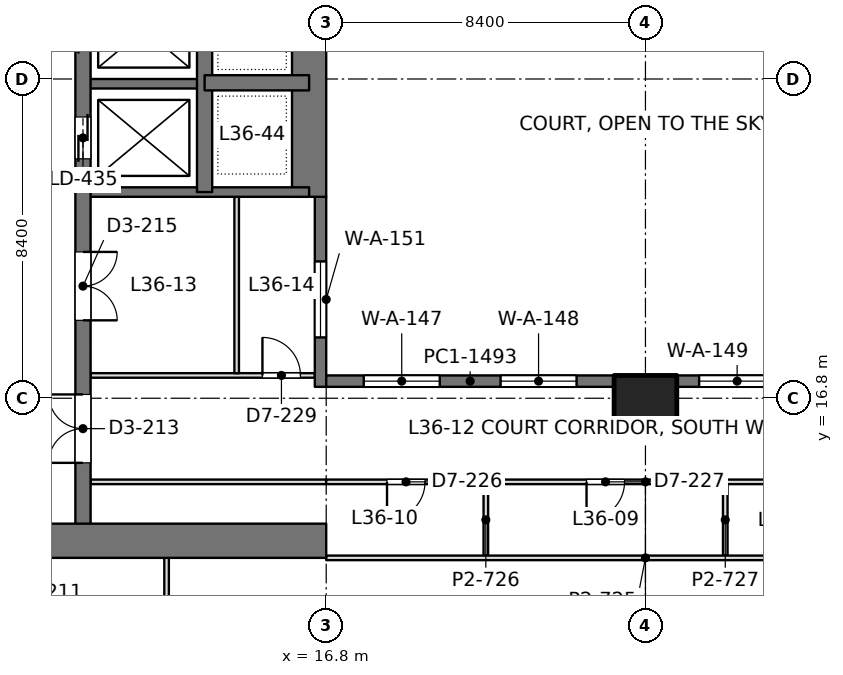
"""IFC4 building model, lengths in metres.
Left out: names, types, materials, properties, quantities, classifications, styles, units other than length and angle.
Written with IfcOpenShell. Run it as: python <this file> out.ifc"""

import sys

from ifc_helpers import new_model, si_unit, direction, frame, frame_2d, origin, origin_2d, place, context, subcontext, project, spatial, rectangle, extrude, element, fill, save


model = new_model("IFC4")
c1 = context("Model", 3, precision=1e-05, world=origin(), true_north=direction((0.0, 1.0)))
c2 = subcontext(c1, "Body", "Model", "MODEL_VIEW")
j1 = project(units=[si_unit("LENGTHUNIT", "METRE"), si_unit("PLANEANGLEUNIT", "RADIAN")], contexts=[c1])
p1 = place(None, origin())
s1 = spatial("IfcSite", under=j1, at=p1, CompositionType="ELEMENT")
p2 = place(p1, origin())
s2 = spatial("IfcBuilding", under=s1, at=p2, CompositionType="ELEMENT")
p3 = place(p2, frame((0.0, 0.0, 159.6)))
s3 = spatial("IfcBuildingStorey", under=s2, at=p3, CompositionType="ELEMENT", Elevation=159.6)
p4 = place(p3, frame((25.2, 16.8, 0.0), z_axis=(0.0, 0.0, 1.0), x_axis=(1.0, 0.0, 0.0)))
e1 = element("IfcColumn", 1, at=p4, inside=s3, PredefinedType="COLUMN", context=c2, shape_type="SweptSolid", body=[
    extrude(rectangle(XDim=1.65, YDim=1.2, at=origin_2d()), origin(), (0.0, 0.0, 1.0), 4.2),
])
p5 = place(p3, frame((-1.2, 13.05, 0.0), z_axis=(0.0, 0.0, 1.0), x_axis=(1.0, 0.0, 0.0)))
e2 = element("IfcWall", 2, at=p5, inside=s3, PredefinedType="SHEAR", context=c2, shape_type="SweptSolid", body=[
    extrude(rectangle(XDim=18.0, YDim=0.9, at=frame_2d((9.0, 0.0))), origin(), (0.0, 0.0, 1.0), 4.2),
])
p6 = place(p5, frame((8.95, 0.0, 0.0)))
e3 = element("IfcOpeningElement", 3, at=p6, cuts=e2, PredefinedType="OPENING", context=c2, shape_type="SweptSolid", body=[
    extrude(rectangle(XDim=1.8, YDim=2.4, at=frame_2d((0.9, 1.2))), frame((0.0, 0.46, 0.0), z_axis=(0.0, -1.0, 0.0), x_axis=(1.0, 0.0, 0.0)), (0.0, 0.0, 1.0), 0.92),
])
p7 = place(p3, frame((16.35, 22.1, 0.0), z_axis=(0.0, 0.0, 1.0), x_axis=(0.0, 1.0, 0.0)))
e4 = element("IfcWall", 4, at=p7, inside=s3, PredefinedType="SHEAR", context=c2, shape_type="SweptSolid", body=[
    extrude(rectangle(XDim=15.25, YDim=0.9, at=frame_2d((7.625, 0.0))), origin(), (0.0, 0.0, 1.0), 4.2),
])
p8 = place(p3, frame((10.4, 13.05, 0.0), z_axis=(0.0, 0.0, 1.0), x_axis=(0.0, 1.0, 0.0)))
e5 = element("IfcWall", 5, at=p8, inside=s3, PredefinedType="SHEAR", context=c2, shape_type="SweptSolid", body=[
    extrude(rectangle(XDim=24.3, YDim=0.4, at=frame_2d((12.15, 0.0))), origin(), (0.0, 0.0, 1.0), 4.2),
])
p9 = place(p8, frame((10.05, 0.0, 0.0)))
e6 = element("IfcOpeningElement", 6, at=p9, cuts=e5, PredefinedType="OPENING", context=c2, shape_type="SweptSolid", body=[
    extrude(rectangle(XDim=1.1, YDim=2.2, at=frame_2d((0.55, 1.1))), frame((0.0, 0.21, 0.0), z_axis=(0.0, -1.0, 0.0), x_axis=(1.0, 0.0, 0.0)), (0.0, 0.0, 1.0), 0.42),
])
p10 = place(p8, frame((12.9, 0.0, 0.0)))
e7 = element("IfcOpeningElement", 7, at=p10, cuts=e5, PredefinedType="OPENING", context=c2, shape_type="SweptSolid", body=[
    extrude(rectangle(XDim=1.1, YDim=2.2, at=frame_2d((0.55, 1.1))), frame((0.0, 0.21, 0.0), z_axis=(0.0, -1.0, 0.0), x_axis=(1.0, 0.0, 0.0)), (0.0, 0.0, 1.0), 0.42),
])
p11 = place(p8, frame((21.45, 0.0, 0.0)))
e8 = element("IfcOpeningElement", 8, at=p11, cuts=e5, PredefinedType="OPENING", context=c2, shape_type="SweptSolid", body=[
    extrude(rectangle(XDim=1.1, YDim=2.2, at=frame_2d((0.55, 1.1))), frame((0.0, 0.21, 0.0), z_axis=(0.0, -1.0, 0.0), x_axis=(1.0, 0.0, 0.0)), (0.0, 0.0, 1.0), 0.42),
])
p12 = place(p8, frame((2.05, 0.0, 0.0)))
e9 = element("IfcOpeningElement", 9, at=p12, cuts=e5, PredefinedType="OPENING", context=c2, shape_type="SweptSolid", body=[
    extrude(rectangle(XDim=1.8, YDim=2.4, at=frame_2d((0.9, 1.2))), frame((0.0, 0.21, 0.0), z_axis=(0.0, -1.0, 0.0), x_axis=(1.0, 0.0, 0.0)), (0.0, 0.0, 1.0), 0.42),
])
p13 = place(p8, frame((5.8, 0.0, 0.0)))
e10 = element("IfcOpeningElement", 10, at=p13, cuts=e5, PredefinedType="OPENING", context=c2, shape_type="SweptSolid", body=[
    extrude(rectangle(XDim=1.8, YDim=2.4, at=frame_2d((0.9, 1.2))), frame((0.0, 0.21, 0.0), z_axis=(0.0, -1.0, 0.0), x_axis=(1.0, 0.0, 0.0)), (0.0, 0.0, 1.0), 0.42),
])
p14 = place(p3, frame((13.6, 22.225, 0.0), z_axis=(0.0, 0.0, 1.0), x_axis=(0.0, 1.0, 0.0)))
e11 = element("IfcWall", 11, at=p14, inside=s3, PredefinedType="SHEAR", context=c2, shape_type="SweptSolid", body=[
    extrude(rectangle(XDim=15.125, YDim=0.4, at=frame_2d((7.562, 0.0))), origin(), (0.0, 0.0, 1.0), 4.2),
])
p15 = place(p3, frame((13.6, 25.1, 0.0), z_axis=(0.0, 0.0, 1.0), x_axis=(1.0, 0.0, 0.0)))
e12 = element("IfcWall", 12, at=p15, inside=s3, PredefinedType="SHEAR", context=c2, shape_type="SweptSolid", body=[
    extrude(rectangle(XDim=2.75, YDim=0.4, at=frame_2d((1.375, 0.0))), origin(), (0.0, 0.0, 1.0), 4.2),
])
p16 = place(p3, frame((10.4, 22.225, 0.0), z_axis=(0.0, 0.0, 1.0), x_axis=(1.0, 0.0, 0.0)))
e13 = element("IfcWall", 13, at=p16, inside=s3, PredefinedType="SHEAR", context=c2, shape_type="SweptSolid", body=[
    extrude(rectangle(XDim=5.95, YDim=0.25, at=frame_2d((2.975, 0.0))), origin(), (0.0, 0.0, 1.0), 4.2),
])
p17 = place(p3, frame((10.4, 25.075, 0.0), z_axis=(0.0, 0.0, 1.0), x_axis=(1.0, 0.0, 0.0)))
e14 = element("IfcWall", 14, at=p17, inside=s3, PredefinedType="SHEAR", context=c2, shape_type="SweptSolid", body=[
    extrude(rectangle(XDim=3.2, YDim=0.25, at=frame_2d((1.6, 0.0))), origin(), (0.0, 0.0, 1.0), 4.2),
])
p18 = place(p3, frame((16.65, 17.1, 0.0), z_axis=(0.0, 0.0, 1.0), x_axis=(0.0, 1.0, 0.0)))
e15 = element("IfcWall", 15, at=p18, inside=s3, PredefinedType="SOLIDWALL", context=c2, shape_type="SweptSolid", body=[
    extrude(rectangle(XDim=5.0, YDim=0.3, at=frame_2d((2.5, 0.0))), origin(), (0.0, 0.0, 1.0), 4.05),
])
p19 = place(p18, frame((1.3, 0.0, 0.1)))
e16 = element("IfcOpeningElement", 16, at=p19, cuts=e15, PredefinedType="OPENING", context=c2, shape_type="SweptSolid", body=[
    extrude(rectangle(XDim=2.0, YDim=3.0, at=frame_2d((1.0, 1.5))), frame((0.0, 0.16, 0.0), z_axis=(0.0, -1.0, 0.0), x_axis=(1.0, 0.0, 0.0)), (0.0, 0.0, 1.0), 0.32),
])
p20 = place(p3, frame((16.8, 17.25, 0.0), z_axis=(0.0, 0.0, 1.0), x_axis=(1.0, 0.0, 0.0)))
e17 = element("IfcWall", 17, at=p20, inside=s3, PredefinedType="SOLIDWALL", context=c2, shape_type="SweptSolid", body=[
    extrude(rectangle(XDim=7.575, YDim=0.3, at=frame_2d((3.788, 0.0))), origin(), (0.0, 0.0, 1.0), 4.05),
])
p21 = place(p20, frame((0.988, 0.0, 0.1)))
e18 = element("IfcOpeningElement", 18, at=p21, cuts=e17, PredefinedType="OPENING", context=c2, shape_type="SweptSolid", body=[
    extrude(rectangle(XDim=2.0, YDim=3.0, at=frame_2d((1.0, 1.5))), frame((0.0, 0.16, 0.0), z_axis=(0.0, -1.0, 0.0), x_axis=(1.0, 0.0, 0.0)), (0.0, 0.0, 1.0), 0.32),
])
p22 = place(p20, frame((4.587, 0.0, 0.1)))
e19 = element("IfcOpeningElement", 19, at=p22, cuts=e17, PredefinedType="OPENING", context=c2, shape_type="SweptSolid", body=[
    extrude(rectangle(XDim=2.0, YDim=3.0, at=frame_2d((1.0, 1.5))), frame((0.0, 0.16, 0.0), z_axis=(0.0, -1.0, 0.0), x_axis=(1.0, 0.0, 0.0)), (0.0, 0.0, 1.0), 0.32),
])
p23 = place(p3, frame((26.025, 17.25, 0.0), z_axis=(0.0, 0.0, 1.0), x_axis=(1.0, 0.0, 0.0)))
e20 = element("IfcWall", 20, at=p23, inside=s3, PredefinedType="SOLIDWALL", context=c2, shape_type="SweptSolid", body=[
    extrude(rectangle(XDim=7.575, YDim=0.3, at=frame_2d((3.788, 0.0))), origin(), (0.0, 0.0, 1.0), 4.05),
])
p24 = place(p23, frame((0.587, 0.0, 0.1)))
e21 = element("IfcOpeningElement", 21, at=p24, cuts=e20, PredefinedType="OPENING", context=c2, shape_type="SweptSolid", body=[
    extrude(rectangle(XDim=2.0, YDim=3.0, at=frame_2d((1.0, 1.5))), frame((0.0, 0.16, 0.0), z_axis=(0.0, -1.0, 0.0), x_axis=(1.0, 0.0, 0.0)), (0.0, 0.0, 1.0), 0.32),
])
p25 = place(p23, frame((4.188, 0.0, 0.1)))
e22 = element("IfcOpeningElement", 22, at=p25, cuts=e20, PredefinedType="OPENING", context=c2, shape_type="SweptSolid", body=[
    extrude(rectangle(XDim=2.0, YDim=3.0, at=frame_2d((1.0, 1.5))), frame((0.0, 0.16, 0.0), z_axis=(0.0, -1.0, 0.0), x_axis=(1.0, 0.0, 0.0)), (0.0, 0.0, 1.0), 0.32),
])
p26 = place(p3, frame((10.598, 17.4, 0.0), z_axis=(0.0, 0.0, 1.0), x_axis=(1.0, 0.0, 0.0)))
e23 = element("IfcWall", 23, at=p26, inside=s3, PredefinedType="PARTITIONING", context=c2, shape_type="SweptSolid", body=[
    extrude(rectangle(XDim=5.904, YDim=0.12, at=frame_2d((2.952, 0.0))), origin(), (0.0, 0.0, 1.0), 3.55),
])
p27 = place(p26, frame((4.524, 0.0, 0.0)))
e24 = element("IfcOpeningElement", 24, at=p27, cuts=e23, PredefinedType="OPENING", context=c2, shape_type="SweptSolid", body=[
    extrude(rectangle(XDim=1.0, YDim=2.4, at=frame_2d((0.5, 1.2))), frame((0.0, 0.07, 0.0), z_axis=(0.0, -1.0, 0.0), x_axis=(1.0, 0.0, 0.0)), (0.0, 0.0, 1.0), 0.14),
])
p28 = place(p3, frame((14.444, 17.458, 0.0), z_axis=(0.0, 0.0, 1.0), x_axis=(0.0, 1.0, 0.0)))
e25 = element("IfcWall", 25, at=p28, inside=s3, PredefinedType="PARTITIONING", context=c2, shape_type="SweptSolid", body=[
    extrude(rectangle(XDim=4.644, YDim=0.12, at=frame_2d((2.322, 0.0))), origin(), (0.0, 0.0, 1.0), 3.6),
])
p29 = place(p3, frame((12.6, 1.898, 0.0), z_axis=(0.0, 0.0, 1.0), x_axis=(0.0, 1.0, 0.0)))
e26 = element("IfcWall", 26, at=p29, inside=s3, PredefinedType="PARTITIONING", context=c2, shape_type="SweptSolid", body=[
    extrude(rectangle(XDim=10.704, YDim=0.12, at=frame_2d((5.352, 0.0))), origin(), (0.0, 0.0, 1.0), 3.55),
])
p30 = place(p3, frame((10.598, 14.6, 0.0), z_axis=(0.0, 0.0, 1.0), x_axis=(1.0, 0.0, 0.0)))
e27 = element("IfcWall", 27, at=p30, inside=s3, PredefinedType="PARTITIONING", context=c2, shape_type="SweptSolid", body=[
    extrude(rectangle(XDim=6.204, YDim=0.12, at=frame_2d((3.102, 0.0))), origin(), (0.0, 0.0, 1.0), 3.55),
])
for number, where, z_axis, x_axis in (
    (28, (21.0, 12.658, 0.0), (0.0, 0.0, 1.0), (0.0, 1.0, 0.0)),
    (29, (27.3, 12.658, 0.0), (0.0, 0.0, 1.0), (0.0, 1.0, 0.0)),
):
    element("IfcWall", number, at=place(p3, frame(where, z_axis=z_axis, x_axis=x_axis)), inside=s3, PredefinedType="PARTITIONING", context=c2, shape_type="SweptSolid", body=[
        extrude(rectangle(XDim=1.884, YDim=0.12, at=frame_2d((0.942, 0.0))), origin(), (0.0, 0.0, 1.0), 4.05),
    ])
p31 = place(p3, frame((16.798, 14.6, 0.0), z_axis=(0.0, 0.0, 1.0), x_axis=(1.0, 0.0, 0.0)))
e30 = element("IfcWall", 30, at=p31, inside=s3, PredefinedType="PARTITIONING", context=c2, shape_type="SweptSolid", body=[
    extrude(rectangle(XDim=16.804, YDim=0.12, at=frame_2d((8.402, 0.0))), origin(), (0.0, 0.0, 1.0), 3.55),
])
p32 = place(p31, frame((1.602, 0.0, 0.0)))
e31 = element("IfcOpeningElement", 31, at=p32, cuts=e30, PredefinedType="OPENING", context=c2, shape_type="SweptSolid", body=[
    extrude(rectangle(XDim=1.0, YDim=2.4, at=frame_2d((0.5, 1.2))), frame((0.0, 0.07, 0.0), z_axis=(0.0, -1.0, 0.0), x_axis=(1.0, 0.0, 0.0)), (0.0, 0.0, 1.0), 0.14),
])
p33 = place(p31, frame((6.852, 0.0, 0.0)))
e32 = element("IfcOpeningElement", 32, at=p33, cuts=e30, PredefinedType="OPENING", context=c2, shape_type="SweptSolid", body=[
    extrude(rectangle(XDim=1.0, YDim=2.4, at=frame_2d((0.5, 1.2))), frame((0.0, 0.07, 0.0), z_axis=(0.0, -1.0, 0.0), x_axis=(1.0, 0.0, 0.0)), (0.0, 0.0, 1.0), 0.14),
])
p34 = place(p31, frame((13.152, 0.0, 0.0)))
e33 = element("IfcOpeningElement", 33, at=p34, cuts=e30, PredefinedType="OPENING", context=c2, shape_type="SweptSolid", body=[
    extrude(rectangle(XDim=1.0, YDim=2.4, at=frame_2d((0.5, 1.2))), frame((0.0, 0.07, 0.0), z_axis=(0.0, -1.0, 0.0), x_axis=(1.0, 0.0, 0.0)), (0.0, 0.0, 1.0), 0.14),
])
p35 = place(p3, frame((16.8, 12.6, 0.0), z_axis=(0.0, 0.0, 1.0), x_axis=(1.0, 0.0, 0.0)))
e34 = element("IfcWall", 34, at=p35, inside=s3, PredefinedType="PARTITIONING", context=c2, shape_type="SweptSolid", body=[
    extrude(rectangle(XDim=16.8, YDim=0.12, at=frame_2d((8.4, 0.0))), origin(), (0.0, 0.0, 1.0), 3.55),
])
p36 = place(p19, origin())
e35 = element("IfcWindow", 35, at=p36, inside=s3, PartitioningType="SINGLE_PANEL", PredefinedType="WINDOW", context=c2, shape_type="SweptSolid", body=[
    extrude(rectangle(XDim=2.0, YDim=3.0, at=frame_2d((1.0, 1.5))), frame((0.0, 0.03, 0.0), z_axis=(0.0, -1.0, 0.0), x_axis=(1.0, 0.0, 0.0)), (0.0, 0.0, 1.0), 0.06),
])
fill(e16, e35)
p37 = place(p21, origin())
e36 = element("IfcWindow", 36, at=p37, inside=s3, PartitioningType="SINGLE_PANEL", PredefinedType="WINDOW", context=c2, shape_type="SweptSolid", body=[
    extrude(rectangle(XDim=2.0, YDim=3.0, at=frame_2d((1.0, 1.5))), frame((0.0, 0.03, 0.0), z_axis=(0.0, -1.0, 0.0), x_axis=(1.0, 0.0, 0.0)), (0.0, 0.0, 1.0), 0.06),
])
fill(e18, e36)
p38 = place(p22, origin())
e37 = element("IfcWindow", 37, at=p38, inside=s3, PartitioningType="SINGLE_PANEL", PredefinedType="WINDOW", context=c2, shape_type="SweptSolid", body=[
    extrude(rectangle(XDim=2.0, YDim=3.0, at=frame_2d((1.0, 1.5))), frame((0.0, 0.03, 0.0), z_axis=(0.0, -1.0, 0.0), x_axis=(1.0, 0.0, 0.0)), (0.0, 0.0, 1.0), 0.06),
])
fill(e19, e37)
p39 = place(p24, origin())
e38 = element("IfcWindow", 38, at=p39, inside=s3, PartitioningType="SINGLE_PANEL", PredefinedType="WINDOW", context=c2, shape_type="SweptSolid", body=[
    extrude(rectangle(XDim=2.0, YDim=3.0, at=frame_2d((1.0, 1.5))), frame((0.0, 0.03, 0.0), z_axis=(0.0, -1.0, 0.0), x_axis=(1.0, 0.0, 0.0)), (0.0, 0.0, 1.0), 0.06),
])
fill(e21, e38)
p40 = place(p9, origin())
e39 = element("IfcDoor", 39, at=p40, inside=s3, OperationType="DOUBLE_DOOR_SLIDING", PredefinedType="DOOR", context=c2, shape_type="SweptSolid", body=[
    extrude(rectangle(XDim=1.1, YDim=2.2, at=frame_2d((0.55, 1.1))), frame((0.0, 0.025, 0.0), z_axis=(0.0, -1.0, 0.0), x_axis=(1.0, 0.0, 0.0)), (0.0, 0.0, 1.0), 0.05),
])
fill(e6, e39)
p41 = place(p12, origin())
e40 = element("IfcDoor", 40, at=p41, inside=s3, OperationType="DOUBLE_DOOR_SINGLE_SWING", PredefinedType="DOOR", context=c2, shape_type="SweptSolid", body=[
    extrude(rectangle(XDim=1.8, YDim=2.4, at=frame_2d((0.9, 1.2))), frame((0.0, 0.025, 0.0), z_axis=(0.0, -1.0, 0.0), x_axis=(1.0, 0.0, 0.0)), (0.0, 0.0, 1.0), 0.05),
])
fill(e9, e40)
p42 = place(p13, frame((1.8, 0.0, 0.0), z_axis=(0.0, 0.0, 1.0), x_axis=(-1.0, 0.0, 0.0)))
e41 = element("IfcDoor", 41, at=p42, inside=s3, OperationType="DOUBLE_DOOR_SINGLE_SWING", PredefinedType="DOOR", context=c2, shape_type="SweptSolid", body=[
    extrude(rectangle(XDim=1.8, YDim=2.4, at=frame_2d((0.9, 1.2))), frame((0.0, 0.025, 0.0), z_axis=(0.0, -1.0, 0.0), x_axis=(1.0, 0.0, 0.0)), (0.0, 0.0, 1.0), 0.05),
])
fill(e10, e41)
p43 = place(p27, origin())
e42 = element("IfcDoor", 42, at=p43, inside=s3, OperationType="SINGLE_SWING_LEFT", PredefinedType="DOOR", context=c2, shape_type="SweptSolid", body=[
    extrude(rectangle(XDim=1.0, YDim=2.4, at=frame_2d((0.5, 1.2))), frame((0.0, 0.025, 0.0), z_axis=(0.0, -1.0, 0.0), x_axis=(1.0, 0.0, 0.0)), (0.0, 0.0, 1.0), 0.05),
])
fill(e24, e42)
p44 = place(p32, frame((1.0, 0.0, 0.0), z_axis=(0.0, 0.0, 1.0), x_axis=(-1.0, 0.0, 0.0)))
e43 = element("IfcDoor", 43, at=p44, inside=s3, OperationType="SINGLE_SWING_RIGHT", PredefinedType="DOOR", context=c2, shape_type="SweptSolid", body=[
    extrude(rectangle(XDim=1.0, YDim=2.4, at=frame_2d((0.5, 1.2))), frame((0.0, 0.025, 0.0), z_axis=(0.0, -1.0, 0.0), x_axis=(1.0, 0.0, 0.0)), (0.0, 0.0, 1.0), 0.05),
])
fill(e31, e43)
p45 = place(p33, frame((1.0, 0.0, 0.0), z_axis=(0.0, 0.0, 1.0), x_axis=(-1.0, 0.0, 0.0)))
e44 = element("IfcDoor", 44, at=p45, inside=s3, OperationType="SINGLE_SWING_RIGHT", PredefinedType="DOOR", context=c2, shape_type="SweptSolid", body=[
    extrude(rectangle(XDim=1.0, YDim=2.4, at=frame_2d((0.5, 1.2))), frame((0.0, 0.025, 0.0), z_axis=(0.0, -1.0, 0.0), x_axis=(1.0, 0.0, 0.0)), (0.0, 0.0, 1.0), 0.05),
])
fill(e32, e44)
save(model, sys.argv[1])
